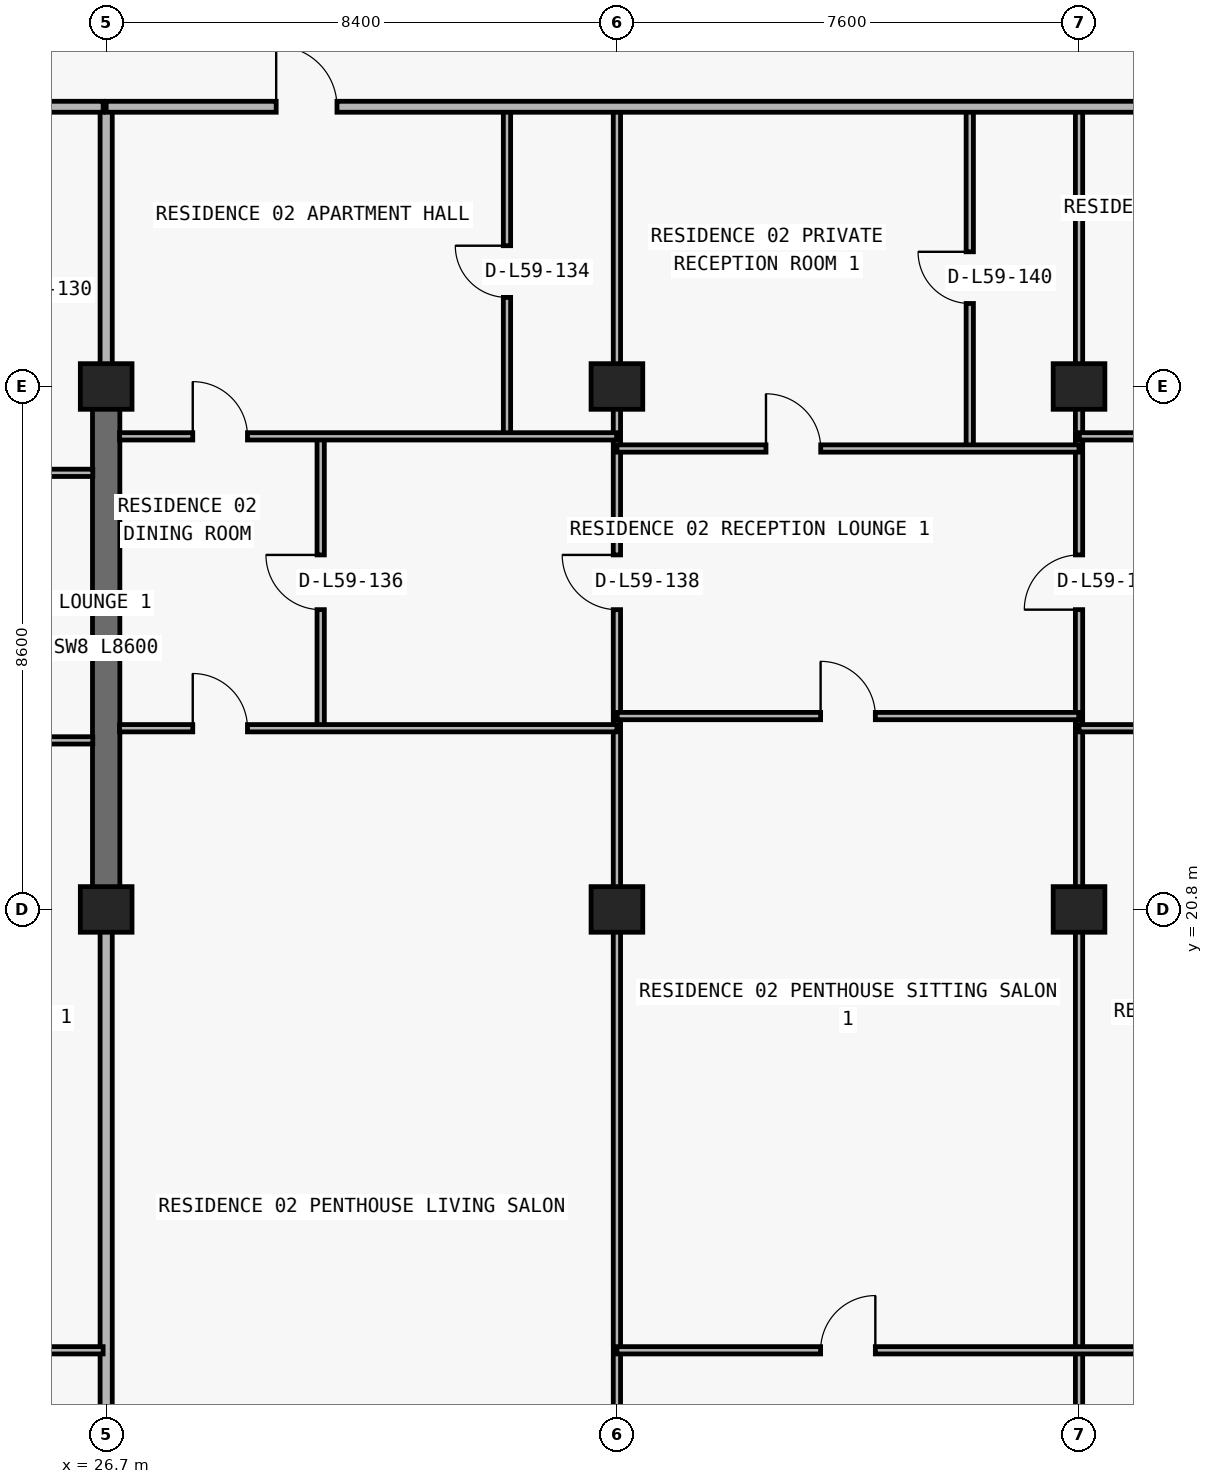
"""IFC4 building model, lengths in metres.
Left out: names, types, materials, properties, quantities, classifications, styles, units other than length and angle.
Written with IfcOpenShell. Run it as: python <this file> out.ifc"""

import sys

from ifc_helpers import new_model, si_unit, direction, frame, frame_2d, origin, origin_2d, place, context, subcontext, project, spatial, rectangle, extrude, element, fill, save


model = new_model("IFC4")
c1 = context("Model", 3, precision=1e-05, world=origin(), true_north=direction((0.0, 1.0)))
c2 = subcontext(c1, "Body", "Model", "MODEL_VIEW")
j1 = project(units=[si_unit("LENGTHUNIT", "METRE"), si_unit("PLANEANGLEUNIT", "RADIAN")], contexts=[c1])
p1 = place(None, origin())
s1 = spatial("IfcSite", under=j1, at=p1, CompositionType="ELEMENT")
p2 = place(p1, origin())
s2 = spatial("IfcBuilding", under=s1, at=p2, CompositionType="ELEMENT")
p3 = place(p2, frame((0.0, 0.0, 211.5)))
s3 = spatial("IfcBuildingStorey", under=s2, at=p3, CompositionType="ELEMENT", Elevation=211.5)
for number, where, z_axis, x_axis in (
    (1, (26.7, 20.8, 0.0), (0.0, 0.0, 1.0), (1.0, 0.0, 0.0)),
    (2, (35.1, 20.8, 0.0), (0.0, 0.0, 1.0), (1.0, 0.0, 0.0)),
    (3, (42.7, 20.8, 0.0), (0.0, 0.0, 1.0), (1.0, 0.0, 0.0)),
    (4, (26.7, 29.4, 0.0), (0.0, 0.0, 1.0), (1.0, 0.0, 0.0)),
    (5, (35.1, 29.4, 0.0), (0.0, 0.0, 1.0), (1.0, 0.0, 0.0)),
    (6, (42.7, 29.4, 0.0), (0.0, 0.0, 1.0), (1.0, 0.0, 0.0)),
):
    element("IfcColumn", number, at=place(p3, frame(where, z_axis=z_axis, x_axis=x_axis)), inside=s3, PredefinedType="COLUMN", context=c2, shape_type="SweptSolid", body=[
        extrude(rectangle(XDim=0.85, YDim=0.75, at=origin_2d()), origin(), (0.0, 0.0, 1.0), 3.05),
    ])
p4 = place(p3, frame((26.7, 20.8, 0.0), z_axis=(0.0, 0.0, 1.0), x_axis=(0.0, 1.0, 0.0)))
e7 = element("IfcWall", 7, at=p4, inside=s3, PredefinedType="SHEAR", context=c2, shape_type="SweptSolid", body=[
    extrude(rectangle(XDim=8.6, YDim=0.45, at=frame_2d((4.3, 0.0))), origin(), (0.0, 0.0, 1.0), 3.05),
])
p5 = place(p3, frame((26.7, 11.24, 0.0), z_axis=(0.0, 0.0, 1.0), x_axis=(0.0, 1.0, 0.0)))
e8 = element("IfcWall", 8, at=p5, inside=s3, PredefinedType="PARTITIONING", context=c2, shape_type="SweptSolid", body=[
    extrude(rectangle(XDim=9.555, YDim=0.2, at=frame_2d((4.777, 0.0))), origin(), (0.0, 0.0, 1.0), 2.263),
])
p6 = place(p3, frame((26.7, 29.405, 0.0), z_axis=(0.0, 0.0, 1.0), x_axis=(0.0, 1.0, 0.0)))
e9 = element("IfcWall", 9, at=p6, inside=s3, PredefinedType="PARTITIONING", context=c2, shape_type="SweptSolid", body=[
    extrude(rectangle(XDim=4.595, YDim=0.2, at=frame_2d((2.297, 0.0))), origin(), (0.0, 0.0, 1.0), 2.335),
])
p7 = place(p3, frame((30.228, 23.78, 0.0), z_axis=(0.0, 0.0, 1.0), x_axis=(0.0, 1.0, 0.0)))
e10 = element("IfcWall", 10, at=p7, inside=s3, PredefinedType="PARTITIONING", context=c2, shape_type="SweptSolid", body=[
    extrude(rectangle(XDim=4.8, YDim=0.12, at=frame_2d((2.4, 0.0))), origin(), (0.0, 0.0, 1.0), 3.05),
])
p8 = place(p7, frame((1.95, 0.0, 0.0)))
e11 = element("IfcOpeningElement", 11, at=p8, cuts=e10, PredefinedType="OPENING", context=c2, shape_type="SweptSolid", body=[
    extrude(rectangle(XDim=0.9, YDim=2.15, at=frame_2d((0.45, 1.075))), frame((0.0, 0.07, 0.0), z_axis=(0.0, -1.0, 0.0), x_axis=(1.0, 0.0, 0.0)), (0.0, 0.0, 1.0), 0.14),
])
p9 = place(p3, frame((33.292, 28.58, 0.0), z_axis=(0.0, 0.0, 1.0), x_axis=(0.0, 1.0, 0.0)))
e12 = element("IfcWall", 12, at=p9, inside=s3, PredefinedType="PARTITIONING", context=c2, shape_type="SweptSolid", body=[
    extrude(rectangle(XDim=5.42, YDim=0.12, at=frame_2d((2.71, 0.0))), origin(), (0.0, 0.0, 1.0), 3.05),
])
p10 = place(p9, frame((2.285, 0.0, 0.0)))
e13 = element("IfcOpeningElement", 13, at=p10, cuts=e12, PredefinedType="OPENING", context=c2, shape_type="SweptSolid", body=[
    extrude(rectangle(XDim=0.85, YDim=2.1, at=frame_2d((0.425, 1.05))), frame((0.0, 0.07, 0.0), z_axis=(0.0, -1.0, 0.0), x_axis=(1.0, 0.0, 0.0)), (0.0, 0.0, 1.0), 0.14),
])
p11 = place(p3, frame((35.1, 11.24, 0.0), z_axis=(0.0, 0.0, 1.0), x_axis=(0.0, 1.0, 0.0)))
e14 = element("IfcWall", 14, at=p11, inside=s3, PredefinedType="PARTITIONING", context=c2, shape_type="SweptSolid", body=[
    extrude(rectangle(XDim=22.76, YDim=0.12, at=frame_2d((11.38, 0.0))), origin(), (0.0, 0.0, 1.0), 2.263),
])
p12 = place(p11, frame((14.49, 0.0, 0.0)))
e15 = element("IfcOpeningElement", 15, at=p12, cuts=e14, PredefinedType="OPENING", context=c2, shape_type="SweptSolid", body=[
    extrude(rectangle(XDim=0.9, YDim=2.15, at=frame_2d((0.45, 1.075))), frame((0.0, 0.07, 0.0), z_axis=(0.0, -1.0, 0.0), x_axis=(1.0, 0.0, 0.0)), (0.0, 0.0, 1.0), 0.14),
])
p13 = place(p3, frame((40.903, 28.38, 0.0), z_axis=(0.0, 0.0, 1.0), x_axis=(0.0, 1.0, 0.0)))
e16 = element("IfcWall", 16, at=p13, inside=s3, PredefinedType="PARTITIONING", context=c2, shape_type="SweptSolid", body=[
    extrude(rectangle(XDim=5.62, YDim=0.12, at=frame_2d((2.81, 0.0))), origin(), (0.0, 0.0, 1.0), 3.05),
])
p14 = place(p13, frame((2.385, 0.0, 0.0)))
e17 = element("IfcOpeningElement", 17, at=p14, cuts=e16, PredefinedType="OPENING", context=c2, shape_type="SweptSolid", body=[
    extrude(rectangle(XDim=0.85, YDim=2.1, at=frame_2d((0.425, 1.05))), frame((0.0, 0.07, 0.0), z_axis=(0.0, -1.0, 0.0), x_axis=(1.0, 0.0, 0.0)), (0.0, 0.0, 1.0), 0.14),
])
p15 = place(p3, frame((42.7, 11.24, 0.0), z_axis=(0.0, 0.0, 1.0), x_axis=(0.0, 1.0, 0.0)))
e18 = element("IfcWall", 18, at=p15, inside=s3, PredefinedType="PARTITIONING", context=c2, shape_type="SweptSolid", body=[
    extrude(rectangle(XDim=22.76, YDim=0.12, at=frame_2d((11.38, 0.0))), origin(), (0.0, 0.0, 1.0), 2.263),
])
p16 = place(p15, frame((14.49, 0.0, 0.0)))
e19 = element("IfcOpeningElement", 19, at=p16, cuts=e18, PredefinedType="OPENING", context=c2, shape_type="SweptSolid", body=[
    extrude(rectangle(XDim=0.9, YDim=2.15, at=frame_2d((0.45, 1.075))), frame((0.0, 0.07, 0.0), z_axis=(0.0, -1.0, 0.0), x_axis=(1.0, 0.0, 0.0)), (0.0, 0.0, 1.0), 0.14),
])
p17 = place(p3, frame((18.3, 13.55, 0.0), z_axis=(0.0, 0.0, 1.0), x_axis=(1.0, 0.0, 0.0)))
e20 = element("IfcWall", 20, at=p17, inside=s3, PredefinedType="PARTITIONING", context=c2, shape_type="SweptSolid", body=[
    extrude(rectangle(XDim=8.35, YDim=0.12, at=frame_2d((4.175, 0.0))), origin(), (0.0, 0.0, 1.0), 3.05),
])
p18 = place(p17, frame((3.725, 0.0, 0.0)))
e21 = element("IfcOpeningElement", 21, at=p18, cuts=e20, PredefinedType="OPENING", context=c2, shape_type="SweptSolid", body=[
    extrude(rectangle(XDim=0.9, YDim=2.15, at=frame_2d((0.45, 1.075))), frame((0.0, 0.07, 0.0), z_axis=(0.0, -1.0, 0.0), x_axis=(1.0, 0.0, 0.0)), (0.0, 0.0, 1.0), 0.14),
])
p19 = place(p3, frame((35.1, 13.55, 0.0), z_axis=(0.0, 0.0, 1.0), x_axis=(1.0, 0.0, 0.0)))
e22 = element("IfcWall", 22, at=p19, inside=s3, PredefinedType="PARTITIONING", context=c2, shape_type="SweptSolid", body=[
    extrude(rectangle(XDim=16.0, YDim=0.12, at=frame_2d((8.0, 0.0))), origin(), (0.0, 0.0, 1.0), 3.05),
])
p20 = place(p19, frame((3.35, 0.0, 0.0)))
e23 = element("IfcOpeningElement", 23, at=p20, cuts=e22, PredefinedType="OPENING", context=c2, shape_type="SweptSolid", body=[
    extrude(rectangle(XDim=0.9, YDim=2.15, at=frame_2d((0.45, 1.075))), frame((0.0, 0.07, 0.0), z_axis=(0.0, -1.0, 0.0), x_axis=(1.0, 0.0, 0.0)), (0.0, 0.0, 1.0), 0.14),
])
p21 = place(p19, frame((11.35, 0.0, 0.0)))
e24 = element("IfcOpeningElement", 24, at=p21, cuts=e22, PredefinedType="OPENING", context=c2, shape_type="SweptSolid", body=[
    extrude(rectangle(XDim=0.9, YDim=2.15, at=frame_2d((0.45, 1.075))), frame((0.0, 0.07, 0.0), z_axis=(0.0, -1.0, 0.0), x_axis=(1.0, 0.0, 0.0)), (0.0, 0.0, 1.0), 0.14),
])
p22 = place(p3, frame((18.305, 23.58, 0.0), z_axis=(0.0, 0.0, 1.0), x_axis=(1.0, 0.0, 0.0)))
e25 = element("IfcWall", 25, at=p22, inside=s3, PredefinedType="PARTITIONING", context=c2, shape_type="SweptSolid", body=[
    extrude(rectangle(XDim=8.175, YDim=0.12, at=frame_2d((4.087, 0.0))), origin(), (0.0, 0.0, 1.0), 3.05),
])
p23 = place(p22, frame((3.637, 0.0, 0.0)))
e26 = element("IfcOpeningElement", 26, at=p23, cuts=e25, PredefinedType="OPENING", context=c2, shape_type="SweptSolid", body=[
    extrude(rectangle(XDim=0.9, YDim=2.15, at=frame_2d((0.45, 1.075))), frame((0.0, 0.07, 0.0), z_axis=(0.0, -1.0, 0.0), x_axis=(1.0, 0.0, 0.0)), (0.0, 0.0, 1.0), 0.14),
])
p24 = place(p3, frame((26.92, 23.78, 0.0), z_axis=(0.0, 0.0, 1.0), x_axis=(1.0, 0.0, 0.0)))
e27 = element("IfcWall", 27, at=p24, inside=s3, PredefinedType="PARTITIONING", context=c2, shape_type="SweptSolid", body=[
    extrude(rectangle(XDim=8.18, YDim=0.12, at=frame_2d((4.09, 0.0))), origin(), (0.0, 0.0, 1.0), 3.05),
])
p25 = place(p24, frame((1.204, 0.0, 0.0)))
e28 = element("IfcOpeningElement", 28, at=p25, cuts=e27, PredefinedType="OPENING", context=c2, shape_type="SweptSolid", body=[
    extrude(rectangle(XDim=0.9, YDim=2.15, at=frame_2d((0.45, 1.075))), frame((0.0, 0.07, 0.0), z_axis=(0.0, -1.0, 0.0), x_axis=(1.0, 0.0, 0.0)), (0.0, 0.0, 1.0), 0.14),
])
p26 = place(p3, frame((42.7, 23.78, 0.0), z_axis=(0.0, 0.0, 1.0), x_axis=(1.0, 0.0, 0.0)))
e29 = element("IfcWall", 29, at=p26, inside=s3, PredefinedType="PARTITIONING", context=c2, shape_type="SweptSolid", body=[
    extrude(rectangle(XDim=8.18, YDim=0.12, at=frame_2d((4.09, 0.0))), origin(), (0.0, 0.0, 1.0), 3.05),
])
p27 = place(p26, frame((3.64, 0.0, 0.0)))
e30 = element("IfcOpeningElement", 30, at=p27, cuts=e29, PredefinedType="OPENING", context=c2, shape_type="SweptSolid", body=[
    extrude(rectangle(XDim=0.9, YDim=2.15, at=frame_2d((0.45, 1.075))), frame((0.0, 0.07, 0.0), z_axis=(0.0, -1.0, 0.0), x_axis=(1.0, 0.0, 0.0)), (0.0, 0.0, 1.0), 0.14),
])
p28 = place(p3, frame((35.105, 23.98, 0.0), z_axis=(0.0, 0.0, 1.0), x_axis=(1.0, 0.0, 0.0)))
e31 = element("IfcWall", 31, at=p28, inside=s3, PredefinedType="PARTITIONING", context=c2, shape_type="SweptSolid", body=[
    extrude(rectangle(XDim=7.59, YDim=0.12, at=frame_2d((3.795, 0.0))), origin(), (0.0, 0.0, 1.0), 3.05),
])
p29 = place(p28, frame((3.345, 0.0, 0.0)))
e32 = element("IfcOpeningElement", 32, at=p29, cuts=e31, PredefinedType="OPENING", context=c2, shape_type="SweptSolid", body=[
    extrude(rectangle(XDim=0.9, YDim=2.15, at=frame_2d((0.45, 1.075))), frame((0.0, 0.07, 0.0), z_axis=(0.0, -1.0, 0.0), x_axis=(1.0, 0.0, 0.0)), (0.0, 0.0, 1.0), 0.14),
])
p30 = place(p3, frame((18.3, 27.98, 0.0), z_axis=(0.0, 0.0, 1.0), x_axis=(1.0, 0.0, 0.0)))
e33 = element("IfcWall", 33, at=p30, inside=s3, PredefinedType="PARTITIONING", context=c2, shape_type="SweptSolid", body=[
    extrude(rectangle(XDim=8.18, YDim=0.12, at=frame_2d((4.09, 0.0))), origin(), (0.0, 0.0, 1.0), 3.05),
])
p31 = place(p30, frame((2.952, 0.0, 0.0)))
e34 = element("IfcOpeningElement", 34, at=p31, cuts=e33, PredefinedType="OPENING", context=c2, shape_type="SweptSolid", body=[
    extrude(rectangle(XDim=0.9, YDim=2.15, at=frame_2d((0.45, 1.075))), frame((0.0, 0.07, 0.0), z_axis=(0.0, -1.0, 0.0), x_axis=(1.0, 0.0, 0.0)), (0.0, 0.0, 1.0), 0.14),
])
p32 = place(p3, frame((35.1, 28.38, 0.0), z_axis=(0.0, 0.0, 1.0), x_axis=(1.0, 0.0, 0.0)))
e35 = element("IfcWall", 35, at=p32, inside=s3, PredefinedType="PARTITIONING", context=c2, shape_type="SweptSolid", body=[
    extrude(rectangle(XDim=7.6, YDim=0.12, at=frame_2d((3.8, 0.0))), origin(), (0.0, 0.0, 1.0), 3.05),
])
p33 = place(p32, frame((2.451, 0.0, 0.0)))
e36 = element("IfcOpeningElement", 36, at=p33, cuts=e35, PredefinedType="OPENING", context=c2, shape_type="SweptSolid", body=[
    extrude(rectangle(XDim=0.9, YDim=2.15, at=frame_2d((0.45, 1.075))), frame((0.0, 0.07, 0.0), z_axis=(0.0, -1.0, 0.0), x_axis=(1.0, 0.0, 0.0)), (0.0, 0.0, 1.0), 0.14),
])
p34 = place(p3, frame((26.92, 28.58, 0.0), z_axis=(0.0, 0.0, 1.0), x_axis=(1.0, 0.0, 0.0)))
e37 = element("IfcWall", 37, at=p34, inside=s3, PredefinedType="PARTITIONING", context=c2, shape_type="SweptSolid", body=[
    extrude(rectangle(XDim=8.175, YDim=0.12, at=frame_2d((4.087, 0.0))), origin(), (0.0, 0.0, 1.0), 3.05),
])
p35 = place(p34, frame((1.204, 0.0, 0.0)))
e38 = element("IfcOpeningElement", 38, at=p35, cuts=e37, PredefinedType="OPENING", context=c2, shape_type="SweptSolid", body=[
    extrude(rectangle(XDim=0.9, YDim=2.15, at=frame_2d((0.45, 1.075))), frame((0.0, 0.07, 0.0), z_axis=(0.0, -1.0, 0.0), x_axis=(1.0, 0.0, 0.0)), (0.0, 0.0, 1.0), 0.14),
])
p36 = place(p3, frame((42.705, 28.58, 0.0), z_axis=(0.0, 0.0, 1.0), x_axis=(1.0, 0.0, 0.0)))
e39 = element("IfcWall", 39, at=p36, inside=s3, PredefinedType="PARTITIONING", context=c2, shape_type="SweptSolid", body=[
    extrude(rectangle(XDim=8.175, YDim=0.12, at=frame_2d((4.087, 0.0))), origin(), (0.0, 0.0, 1.0), 3.05),
])
p37 = place(p36, frame((2.862, 0.0, 0.0)))
e40 = element("IfcOpeningElement", 40, at=p37, cuts=e39, PredefinedType="OPENING", context=c2, shape_type="SweptSolid", body=[
    extrude(rectangle(XDim=0.9, YDim=2.15, at=frame_2d((0.45, 1.075))), frame((0.0, 0.07, 0.0), z_axis=(0.0, -1.0, 0.0), x_axis=(1.0, 0.0, 0.0)), (0.0, 0.0, 1.0), 0.14),
])
p38 = place(p3, frame((10.105, 34.0, 0.0), z_axis=(0.0, 0.0, 1.0), x_axis=(1.0, 0.0, 0.0)))
e41 = element("IfcWall", 41, at=p38, inside=s3, PredefinedType="PARTITIONING", context=c2, shape_type="SweptSolid", body=[
    extrude(rectangle(XDim=16.545, YDim=0.18, at=frame_2d((8.272, 0.0))), origin(), (0.0, 0.0, 1.0), 3.05),
])
p39 = place(p38, frame((2.712, 0.0, 0.0)))
e42 = element("IfcOpeningElement", 42, at=p39, cuts=e41, PredefinedType="OPENING", context=c2, shape_type="SweptSolid", body=[
    extrude(rectangle(XDim=1.0, YDim=2.2, at=frame_2d((0.5, 1.1))), frame((0.0, 0.1, 0.0), z_axis=(0.0, -1.0, 0.0), x_axis=(1.0, 0.0, 0.0)), (0.0, 0.0, 1.0), 0.2),
])
p40 = place(p3, frame((26.7, 34.0, 0.0), z_axis=(0.0, 0.0, 1.0), x_axis=(1.0, 0.0, 0.0)))
e43 = element("IfcWall", 43, at=p40, inside=s3, PredefinedType="PARTITIONING", context=c2, shape_type="SweptSolid", body=[
    extrude(rectangle(XDim=41.0, YDim=0.18, at=frame_2d((20.5, 0.0))), origin(), (0.0, 0.0, 1.0), 3.05),
])
p41 = place(p40, frame((2.796, 0.0, 0.0)))
e44 = element("IfcOpeningElement", 44, at=p41, cuts=e43, PredefinedType="OPENING", context=c2, shape_type="SweptSolid", body=[
    extrude(rectangle(XDim=1.0, YDim=2.2, at=frame_2d((0.5, 1.1))), frame((0.0, 0.1, 0.0), z_axis=(0.0, -1.0, 0.0), x_axis=(1.0, 0.0, 0.0)), (0.0, 0.0, 1.0), 0.2),
])
p42 = place(p40, frame((27.199, 0.0, 0.0)))
e45 = element("IfcOpeningElement", 45, at=p42, cuts=e43, PredefinedType="OPENING", context=c2, shape_type="SweptSolid", body=[
    extrude(rectangle(XDim=1.0, YDim=2.2, at=frame_2d((0.5, 1.1))), frame((0.0, 0.1, 0.0), z_axis=(0.0, -1.0, 0.0), x_axis=(1.0, 0.0, 0.0)), (0.0, 0.0, 1.0), 0.2),
])
p43 = place(p41, origin())
e46 = element("IfcDoor", 46, at=p43, inside=s3, OperationType="SINGLE_SWING_LEFT", PredefinedType="DOOR", context=c2, shape_type="SweptSolid", body=[
    extrude(rectangle(XDim=1.0, YDim=2.2, at=frame_2d((0.5, 1.1))), frame((0.0, 0.025, 0.0), z_axis=(0.0, -1.0, 0.0), x_axis=(1.0, 0.0, 0.0)), (0.0, 0.0, 1.0), 0.05),
])
fill(e44, e46)
p44 = place(p10, origin())
e47 = element("IfcDoor", 47, at=p44, inside=s3, OperationType="SINGLE_SWING_RIGHT", PredefinedType="DOOR", context=c2, shape_type="SweptSolid", body=[
    extrude(rectangle(XDim=0.85, YDim=2.1, at=frame_2d((0.425, 1.05))), frame((0.0, 0.025, 0.0), z_axis=(0.0, -1.0, 0.0), x_axis=(1.0, 0.0, 0.0)), (0.0, 0.0, 1.0), 0.05),
])
fill(e13, e47)
p45 = place(p35, origin())
e48 = element("IfcDoor", 48, at=p45, inside=s3, OperationType="SINGLE_SWING_LEFT", PredefinedType="DOOR", context=c2, shape_type="SweptSolid", body=[
    extrude(rectangle(XDim=0.9, YDim=2.15, at=frame_2d((0.45, 1.075))), frame((0.0, 0.025, 0.0), z_axis=(0.0, -1.0, 0.0), x_axis=(1.0, 0.0, 0.0)), (0.0, 0.0, 1.0), 0.05),
])
fill(e38, e48)
p46 = place(p8, origin())
e49 = element("IfcDoor", 49, at=p46, inside=s3, OperationType="SINGLE_SWING_RIGHT", PredefinedType="DOOR", context=c2, shape_type="SweptSolid", body=[
    extrude(rectangle(XDim=0.9, YDim=2.15, at=frame_2d((0.45, 1.075))), frame((0.0, 0.025, 0.0), z_axis=(0.0, -1.0, 0.0), x_axis=(1.0, 0.0, 0.0)), (0.0, 0.0, 1.0), 0.05),
])
fill(e11, e49)
p47 = place(p25, origin())
e50 = element("IfcDoor", 50, at=p47, inside=s3, OperationType="SINGLE_SWING_LEFT", PredefinedType="DOOR", context=c2, shape_type="SweptSolid", body=[
    extrude(rectangle(XDim=0.9, YDim=2.15, at=frame_2d((0.45, 1.075))), frame((0.0, 0.025, 0.0), z_axis=(0.0, -1.0, 0.0), x_axis=(1.0, 0.0, 0.0)), (0.0, 0.0, 1.0), 0.05),
])
fill(e28, e50)
p48 = place(p12, origin())
e51 = element("IfcDoor", 51, at=p48, inside=s3, OperationType="SINGLE_SWING_RIGHT", PredefinedType="DOOR", context=c2, shape_type="SweptSolid", body=[
    extrude(rectangle(XDim=0.9, YDim=2.15, at=frame_2d((0.45, 1.075))), frame((0.0, 0.025, 0.0), z_axis=(0.0, -1.0, 0.0), x_axis=(1.0, 0.0, 0.0)), (0.0, 0.0, 1.0), 0.05),
])
fill(e15, e51)
p49 = place(p33, origin())
e52 = element("IfcDoor", 52, at=p49, inside=s3, OperationType="SINGLE_SWING_LEFT", PredefinedType="DOOR", context=c2, shape_type="SweptSolid", body=[
    extrude(rectangle(XDim=0.9, YDim=2.15, at=frame_2d((0.45, 1.075))), frame((0.0, 0.025, 0.0), z_axis=(0.0, -1.0, 0.0), x_axis=(1.0, 0.0, 0.0)), (0.0, 0.0, 1.0), 0.05),
])
fill(e36, e52)
p50 = place(p14, origin())
e53 = element("IfcDoor", 53, at=p50, inside=s3, OperationType="SINGLE_SWING_RIGHT", PredefinedType="DOOR", context=c2, shape_type="SweptSolid", body=[
    extrude(rectangle(XDim=0.85, YDim=2.1, at=frame_2d((0.425, 1.05))), frame((0.0, 0.025, 0.0), z_axis=(0.0, -1.0, 0.0), x_axis=(1.0, 0.0, 0.0)), (0.0, 0.0, 1.0), 0.05),
])
fill(e17, e53)
p51 = place(p29, origin())
e54 = element("IfcDoor", 54, at=p51, inside=s3, OperationType="SINGLE_SWING_LEFT", PredefinedType="DOOR", context=c2, shape_type="SweptSolid", body=[
    extrude(rectangle(XDim=0.9, YDim=2.15, at=frame_2d((0.45, 1.075))), frame((0.0, 0.025, 0.0), z_axis=(0.0, -1.0, 0.0), x_axis=(1.0, 0.0, 0.0)), (0.0, 0.0, 1.0), 0.05),
])
fill(e32, e54)
p52 = place(p20, origin())
e55 = element("IfcDoor", 55, at=p52, inside=s3, OperationType="SINGLE_SWING_RIGHT", PredefinedType="DOOR", context=c2, shape_type="SweptSolid", body=[
    extrude(rectangle(XDim=0.9, YDim=2.15, at=frame_2d((0.45, 1.075))), frame((0.0, 0.025, 0.0), z_axis=(0.0, -1.0, 0.0), x_axis=(1.0, 0.0, 0.0)), (0.0, 0.0, 1.0), 0.05),
])
fill(e23, e55)
p53 = place(p16, origin())
e56 = element("IfcDoor", 56, at=p53, inside=s3, OperationType="SINGLE_SWING_LEFT", PredefinedType="DOOR", context=c2, shape_type="SweptSolid", body=[
    extrude(rectangle(XDim=0.9, YDim=2.15, at=frame_2d((0.45, 1.075))), frame((0.0, 0.025, 0.0), z_axis=(0.0, -1.0, 0.0), x_axis=(1.0, 0.0, 0.0)), (0.0, 0.0, 1.0), 0.05),
])
fill(e19, e56)
save(model, sys.argv[1])
